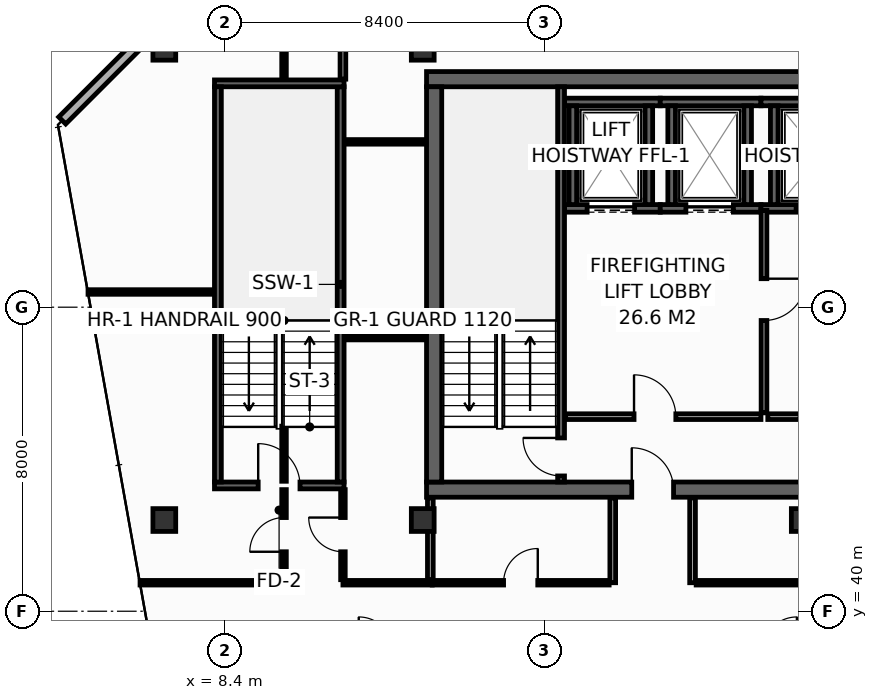
"""IFC4 building model, lengths in metres.
Left out: names, types, materials, properties, quantities, classifications, styles, units other than length and angle.
Written with IfcOpenShell. Run it as: python <this file> out.ifc"""

import sys

from ifc_helpers import new_model, si_unit, direction, frame, frame_2d, origin, origin_2d, place, context, subcontext, project, spatial, rectangle, hollow_rectangle, extrude, element, fill, save


model = new_model("IFC4")
c1 = context("Model", 3, precision=1e-05, world=origin(), true_north=direction((0.0, 1.0)))
c2 = subcontext(c1, "Body", "Model", "MODEL_VIEW")
j1 = project(units=[si_unit("LENGTHUNIT", "METRE"), si_unit("PLANEANGLEUNIT", "RADIAN")], contexts=[c1])
p1 = place(None, origin())
s1 = spatial("IfcSite", under=j1, at=p1, CompositionType="ELEMENT")
p2 = place(p1, origin())
s2 = spatial("IfcBuilding", under=s1, at=p2, CompositionType="ELEMENT")
p3 = place(p2, frame((0.0, 0.0, 268.6)))
s3 = spatial("IfcBuildingStorey", under=s2, at=p3, CompositionType="ELEMENT", Elevation=268.6)
p4 = place(p3, frame((13.7, 43.2, 0.0), z_axis=(0.0, 0.0, 1.0), x_axis=(1.0, 0.0, 0.0)))
e1 = element("IfcWall", 1, at=p4, inside=s3, PredefinedType="SHEAR", context=c2, shape_type="SweptSolid", body=[
    extrude(rectangle(XDim=32.5, YDim=0.4, at=frame_2d((16.25, 0.0))), origin(), (0.0, 0.0, 1.0), 3.55),
])
p5 = place(p4, frame((5.4, 0.0, 0.0)))
e2 = element("IfcOpeningElement", 2, at=p5, cuts=e1, PredefinedType="OPENING", context=c2, shape_type="SweptSolid", body=[
    extrude(rectangle(XDim=1.1, YDim=2.15, at=frame_2d((0.55, 1.075))), frame((0.0, 0.21, 0.0), z_axis=(0.0, -1.0, 0.0), x_axis=(1.0, 0.0, 0.0)), (0.0, 0.0, 1.0), 0.42),
])
p6 = place(p4, frame((25.6, 0.0, 0.0)))
e3 = element("IfcOpeningElement", 3, at=p6, cuts=e1, PredefinedType="OPENING", context=c2, shape_type="SweptSolid", body=[
    extrude(rectangle(XDim=1.1, YDim=2.15, at=frame_2d((0.55, 1.075))), frame((0.0, 0.21, 0.0), z_axis=(0.0, -1.0, 0.0), x_axis=(1.0, 0.0, 0.0)), (0.0, 0.0, 1.0), 0.42),
])
p7 = place(p3, frame((13.7, 54.0, 0.0), z_axis=(0.0, 0.0, 1.0), x_axis=(1.0, 0.0, 0.0)))
e4 = element("IfcWall", 4, at=p7, inside=s3, PredefinedType="SHEAR", context=c2, shape_type="SweptSolid", body=[
    extrude(rectangle(XDim=32.5, YDim=0.4, at=frame_2d((16.25, 0.0))), origin(), (0.0, 0.0, 1.0), 3.55),
])
p8 = place(p3, frame((13.9, 43.4, 0.0), z_axis=(0.0, 0.0, 1.0), x_axis=(0.0, 1.0, 0.0)))
e5 = element("IfcWall", 5, at=p8, inside=s3, PredefinedType="SHEAR", context=c2, shape_type="SweptSolid", body=[
    extrude(rectangle(XDim=10.4, YDim=0.4, at=frame_2d((5.2, 0.0))), origin(), (0.0, 0.0, 1.0), 3.55),
])
for number, where, z_axis, x_axis in (
    (6, (6.8, 54.8, 0.0), (0.0, 0.0, 1.0), (1.0, 0.0, 0.0)),
    (7, (13.6, 54.8, 0.0), (0.0, 0.0, 1.0), (1.0, 0.0, 0.0)),
    (8, (6.8, 42.4, 0.0), (0.0, 0.0, 1.0), (1.0, 0.0, 0.0)),
    (9, (13.6, 42.4, 0.0), (0.0, 0.0, 1.0), (1.0, 0.0, 0.0)),
    (10, (23.6, 42.4, 0.0), (0.0, 0.0, 1.0), (1.0, 0.0, 0.0)),
):
    element("IfcColumn", number, at=place(p3, frame(where, z_axis=z_axis, x_axis=x_axis)), inside=s3, PredefinedType="COLUMN", context=c2, shape_type="SweptSolid", body=[
        extrude(hollow_rectangle(XDim=0.6, YDim=0.6, WallThickness=0.028, at=origin_2d()), origin(), (0.0, 0.0, 1.0), 3.8),
    ])
p9 = place(p3, frame((17.33, 50.6, 0.0), z_axis=(0.0, 0.0, 1.0), x_axis=(1.0, 0.0, 0.0)))
e11 = element("IfcWall", 11, at=p9, inside=s3, PredefinedType="SHEAR", context=c2, shape_type="SweptSolid", body=[
    extrude(rectangle(XDim=2.52, YDim=0.2, at=frame_2d((1.26, 0.0))), origin(), (0.0, 0.0, 1.0), 3.55),
])
p10 = place(p9, frame((0.595, 0.0, 0.0)))
e12 = element("IfcOpeningElement", 12, at=p10, cuts=e11, PredefinedType="OPENING", context=c2, shape_type="SweptSolid", body=[
    extrude(rectangle(XDim=1.25, YDim=2.3, at=frame_2d((0.625, 1.15))), frame((0.0, 0.11, 0.0), z_axis=(0.0, -1.0, 0.0), x_axis=(1.0, 0.0, 0.0)), (0.0, 0.0, 1.0), 0.22),
])
p11 = place(p3, frame((17.33, 53.4, 0.0), z_axis=(0.0, 0.0, 1.0), x_axis=(1.0, 0.0, 0.0)))
e13 = element("IfcWall", 13, at=p11, inside=s3, PredefinedType="SHEAR", context=c2, shape_type="SweptSolid", body=[
    extrude(rectangle(XDim=2.52, YDim=0.2, at=frame_2d((1.26, 0.0))), origin(), (0.0, 0.0, 1.0), 3.55),
])
for number, where, z_axis, x_axis in (
    (14, (17.55, 50.7, 0.0), (0.0, 0.0, 1.0), (0.0, 1.0, 0.0)),
    (15, (19.55, 50.7, 0.0), (0.0, 0.0, 1.0), (0.0, 1.0, 0.0)),
):
    element("IfcWall", number, at=place(p3, frame(where, z_axis=z_axis, x_axis=x_axis)), inside=s3, PredefinedType="SHEAR", context=c2, shape_type="SweptSolid", body=[
        extrude(rectangle(XDim=2.6, YDim=0.2, at=frame_2d((1.3, 0.0))), origin(), (0.0, 0.0, 1.0), 3.55),
    ])
p12 = place(p3, frame((19.85, 50.6, 0.0), z_axis=(0.0, 0.0, 1.0), x_axis=(1.0, 0.0, 0.0)))
e16 = element("IfcWall", 16, at=p12, inside=s3, PredefinedType="SHEAR", context=c2, shape_type="SweptSolid", body=[
    extrude(rectangle(XDim=2.65, YDim=0.2, at=frame_2d((1.325, 0.0))), origin(), (0.0, 0.0, 1.0), 3.55),
])
p13 = place(p12, frame((0.675, 0.0, 0.0)))
e17 = element("IfcOpeningElement", 17, at=p13, cuts=e16, PredefinedType="OPENING", context=c2, shape_type="SweptSolid", body=[
    extrude(rectangle(XDim=1.25, YDim=2.3, at=frame_2d((0.625, 1.15))), frame((0.0, 0.11, 0.0), z_axis=(0.0, -1.0, 0.0), x_axis=(1.0, 0.0, 0.0)), (0.0, 0.0, 1.0), 0.22),
])
p14 = place(p3, frame((19.85, 53.4, 0.0), z_axis=(0.0, 0.0, 1.0), x_axis=(1.0, 0.0, 0.0)))
e18 = element("IfcWall", 18, at=p14, inside=s3, PredefinedType="SHEAR", context=c2, shape_type="SweptSolid", body=[
    extrude(rectangle(XDim=2.65, YDim=0.2, at=frame_2d((1.325, 0.0))), origin(), (0.0, 0.0, 1.0), 3.55),
])
for number, where, z_axis, x_axis in (
    (19, (20.15, 50.7, 0.0), (0.0, 0.0, 1.0), (0.0, 1.0, 0.0)),
    (20, (22.15, 50.7, 0.0), (0.0, 0.0, 1.0), (0.0, 1.0, 0.0)),
):
    element("IfcWall", number, at=place(p3, frame(where, z_axis=z_axis, x_axis=x_axis)), inside=s3, PredefinedType="SHEAR", context=c2, shape_type="SweptSolid", body=[
        extrude(rectangle(XDim=2.6, YDim=0.2, at=frame_2d((1.3, 0.0))), origin(), (0.0, 0.0, 1.0), 3.55),
    ])
p15 = place(p3, frame((22.5, 50.6, 0.0), z_axis=(0.0, 0.0, 1.0), x_axis=(1.0, 0.0, 0.0)))
e21 = element("IfcWall", 21, at=p15, inside=s3, PredefinedType="SHEAR", context=c2, shape_type="SweptSolid", body=[
    extrude(rectangle(XDim=2.85, YDim=0.2, at=frame_2d((1.425, 0.0))), origin(), (0.0, 0.0, 1.0), 3.55),
])
p16 = place(p15, frame((0.925, 0.0, 0.0)))
e22 = element("IfcOpeningElement", 22, at=p16, cuts=e21, PredefinedType="OPENING", context=c2, shape_type="SweptSolid", body=[
    extrude(rectangle(XDim=1.25, YDim=2.3, at=frame_2d((0.625, 1.15))), frame((0.0, 0.11, 0.0), z_axis=(0.0, -1.0, 0.0), x_axis=(1.0, 0.0, 0.0)), (0.0, 0.0, 1.0), 0.22),
])
p17 = place(p3, frame((22.5, 53.4, 0.0), z_axis=(0.0, 0.0, 1.0), x_axis=(1.0, 0.0, 0.0)))
e23 = element("IfcWall", 23, at=p17, inside=s3, PredefinedType="SHEAR", context=c2, shape_type="SweptSolid", body=[
    extrude(rectangle(XDim=2.85, YDim=0.2, at=frame_2d((1.425, 0.0))), origin(), (0.0, 0.0, 1.0), 3.55),
])
p18 = place(p3, frame((22.85, 50.7, 0.0), z_axis=(0.0, 0.0, 1.0), x_axis=(0.0, 1.0, 0.0)))
e24 = element("IfcWall", 24, at=p18, inside=s3, PredefinedType="SHEAR", context=c2, shape_type="SweptSolid", body=[
    extrude(rectangle(XDim=2.6, YDim=0.2, at=frame_2d((1.3, 0.0))), origin(), (0.0, 0.0, 1.0), 3.55),
])
p19 = place(p3, frame((17.24, 43.4, 0.0), z_axis=(0.0, 0.0, 1.0), x_axis=(0.0, 1.0, 0.0)))
e25 = element("IfcWall", 25, at=p19, inside=s3, PredefinedType="SHEAR", context=c2, shape_type="SweptSolid", body=[
    extrude(rectangle(XDim=10.4, YDim=0.18, at=frame_2d((5.2, 0.0))), origin(), (0.0, 0.0, 1.0), 3.55),
])
p20 = place(p19, frame((0.16, 0.0, 0.0)))
e26 = element("IfcOpeningElement", 26, at=p20, cuts=e25, PredefinedType="OPENING", context=c2, shape_type="SweptSolid", body=[
    extrude(rectangle(XDim=1.0, YDim=2.15, at=frame_2d((0.5, 1.075))), frame((0.0, 0.1, 0.0), z_axis=(0.0, -1.0, 0.0), x_axis=(1.0, 0.0, 0.0)), (0.0, 0.0, 1.0), 0.2),
])
p21 = place(p3, frame((8.12, 43.31, 0.0), z_axis=(0.0, 0.0, 1.0), x_axis=(1.0, 0.0, 0.0)))
e27 = element("IfcWall", 27, at=p21, inside=s3, PredefinedType="SHEAR", context=c2, shape_type="SweptSolid", body=[
    extrude(rectangle(XDim=3.41, YDim=0.18, at=frame_2d((1.705, 0.0))), origin(), (0.0, 0.0, 1.0), 3.55),
])
p22 = place(p21, frame((1.15, 0.0, 0.0)))
e28 = element("IfcOpeningElement", 28, at=p22, cuts=e27, PredefinedType="OPENING", context=c2, shape_type="SweptSolid", body=[
    extrude(rectangle(XDim=1.1, YDim=2.15, at=frame_2d((0.55, 1.075))), frame((0.0, 0.1, 0.0), z_axis=(0.0, -1.0, 0.0), x_axis=(1.0, 0.0, 0.0)), (0.0, 0.0, 1.0), 0.2),
])
p23 = place(p3, frame((11.44, 43.4, 0.0), z_axis=(0.0, 0.0, 1.0), x_axis=(0.0, 1.0, 0.0)))
e29 = element("IfcWall", 29, at=p23, inside=s3, PredefinedType="SHEAR", context=c2, shape_type="SweptSolid", body=[
    extrude(rectangle(XDim=10.4, YDim=0.18, at=frame_2d((5.2, 0.0))), origin(), (0.0, 0.0, 1.0), 3.55),
])
p24 = place(p3, frame((11.53, 53.89, 0.0), z_axis=(0.0, 0.0, 1.0), x_axis=(-1.0, 0.0, 0.0)))
e30 = element("IfcWall", 30, at=p24, inside=s3, PredefinedType="SHEAR", context=c2, shape_type="SweptSolid", body=[
    extrude(rectangle(XDim=3.41, YDim=0.18, at=frame_2d((1.705, 0.0))), origin(), (0.0, 0.0, 1.0), 3.55),
])
p25 = place(p3, frame((8.21, 53.8, 0.0), z_axis=(0.0, 0.0, 1.0), x_axis=(0.0, -1.0, 0.0)))
e31 = element("IfcWall", 31, at=p25, inside=s3, PredefinedType="SHEAR", context=c2, shape_type="SweptSolid", body=[
    extrude(rectangle(XDim=10.4, YDim=0.18, at=frame_2d((5.2, 0.0))), origin(), (0.0, 0.0, 1.0), 3.55),
])
p26 = place(p3, frame((17.36, 45.12, 0.0), z_axis=(0.0, 0.0, 1.0), x_axis=(1.0, 0.0, 0.0)))
e32 = element("IfcWall", 32, at=p26, inside=s3, PredefinedType="PARTITIONING", context=c2, shape_type="SweptSolid", body=[
    extrude(rectangle(XDim=5.14, YDim=0.15, at=frame_2d((2.57, 0.0))), origin(), (0.0, 0.0, 1.0), 3.55),
])
p27 = place(p26, frame((1.8, 0.0, 0.0)))
e33 = element("IfcOpeningElement", 33, at=p27, cuts=e32, PredefinedType="OPENING", context=c2, shape_type="SweptSolid", body=[
    extrude(rectangle(XDim=1.1, YDim=2.15, at=frame_2d((0.55, 1.075))), frame((0.0, 0.085, 0.0), z_axis=(0.0, -1.0, 0.0), x_axis=(1.0, 0.0, 0.0)), (0.0, 0.0, 1.0), 0.17),
])
p28 = place(p3, frame((22.58, 50.55, 0.0), z_axis=(0.0, 0.0, 1.0), x_axis=(0.0, -1.0, 0.0)))
e34 = element("IfcWall", 34, at=p28, inside=s3, PredefinedType="PARTITIONING", context=c2, shape_type="SweptSolid", body=[
    extrude(rectangle(XDim=5.33, YDim=0.15, at=frame_2d((2.665, 0.0))), origin(), (0.0, 0.0, 1.0), 3.55),
])
p29 = place(p28, frame((1.8, 0.0, 0.0)))
e35 = element("IfcOpeningElement", 35, at=p29, cuts=e34, PredefinedType="OPENING", context=c2, shape_type="SweptSolid", body=[
    extrude(rectangle(XDim=1.1, YDim=2.15, at=frame_2d((0.55, 1.075))), frame((0.0, 0.085, 0.0), z_axis=(0.0, -1.0, 0.0), x_axis=(1.0, 0.0, 0.0)), (0.0, 0.0, 1.0), 0.17),
])
p30 = place(p3, frame((22.68, 45.12, 0.0), z_axis=(0.0, 0.0, 1.0), x_axis=(1.0, 0.0, 0.0)))
e36 = element("IfcWall", 36, at=p30, inside=s3, PredefinedType="PARTITIONING", context=c2, shape_type="SweptSolid", body=[
    extrude(rectangle(XDim=2.92, YDim=0.15, at=frame_2d((1.46, 0.0))), origin(), (0.0, 0.0, 1.0), 3.55),
])
p31 = place(p30, frame((0.85, 0.0, 0.0)))
e37 = element("IfcOpeningElement", 37, at=p31, cuts=e36, PredefinedType="OPENING", context=c2, shape_type="SweptSolid", body=[
    extrude(rectangle(XDim=1.1, YDim=2.15, at=frame_2d((0.55, 1.075))), frame((0.0, 0.085, 0.0), z_axis=(0.0, -1.0, 0.0), x_axis=(1.0, 0.0, 0.0)), (0.0, 0.0, 1.0), 0.17),
])
p32 = place(p3, frame((7.087, 55.887, 0.0), z_axis=(0.0, 0.0, 1.0), x_axis=(-0.707106781187, -0.707106781187, 0.0)))
e38 = element("IfcWall", 38, at=p32, inside=s3, PredefinedType="STANDARD", context=c2, shape_type="SweptSolid", body=[
    extrude(rectangle(XDim=4.206, YDim=0.26, at=frame_2d((2.103, 0.0))), origin(), (0.0, 0.0, 1.0), 3.55),
])
p33 = place(p3, frame((6.161, 40.75, 0.0), z_axis=(0.0, 0.0, 1.0), x_axis=(1.0, 0.0, 0.0)))
e39 = element("IfcWall", 39, at=p33, inside=s3, PredefinedType="PARTITIONING", context=c2, shape_type="SweptSolid", body=[
    extrude(rectangle(XDim=3.789, YDim=0.12, at=frame_2d((1.894, 0.0))), origin(), (0.0, 0.0, 1.0), 3.085),
])
p34 = place(p3, frame((11.5, 40.75, 0.0), z_axis=(0.0, 0.0, 1.0), x_axis=(1.0, 0.0, 0.0)))
e40 = element("IfcWall", 40, at=p34, inside=s3, PredefinedType="PARTITIONING", context=c2, shape_type="SweptSolid", body=[
    extrude(rectangle(XDim=2.35, YDim=0.12, at=frame_2d((1.175, 0.0))), origin(), (0.0, 0.0, 1.0), 3.55),
])
p35 = place(p3, frame((11.55, 52.35, 0.0), z_axis=(0.0, 0.0, 1.0), x_axis=(1.0, 0.0, 0.0)))
e41 = element("IfcWall", 41, at=p35, inside=s3, PredefinedType="PARTITIONING", context=c2, shape_type="SweptSolid", body=[
    extrude(rectangle(XDim=2.13, YDim=0.12, at=frame_2d((1.065, 0.0))), origin(), (0.0, 0.0, 1.0), 3.55),
])
p36 = place(p3, frame((11.5, 54.0, 0.0), z_axis=(0.0, 0.0, 1.0), x_axis=(0.0, 1.0, 0.0)))
e42 = element("IfcWall", 42, at=p36, inside=s3, PredefinedType="PARTITIONING", context=c2, shape_type="SweptSolid", body=[
    extrude(rectangle(XDim=1.995, YDim=0.15, at=frame_2d((0.998, 0.0))), origin(), (0.0, 0.0, 1.0), 2.935),
])
p37 = place(p3, frame((4.792, 48.4, 0.0), z_axis=(0.0, 0.0, 1.0), x_axis=(1.0, 0.0, 0.0)))
e43 = element("IfcWall", 43, at=p37, inside=s3, PredefinedType="PARTITIONING", context=c2, shape_type="SweptSolid", body=[
    extrude(rectangle(XDim=3.308, YDim=0.12, at=frame_2d((1.654, 0.0))), origin(), (0.0, 0.0, 1.0), 2.947),
])
p38 = place(p3, frame((9.95, 40.83, 0.0), z_axis=(0.0, 0.0, 1.0), x_axis=(0.0, 1.0, 0.0)))
e44 = element("IfcWall", 44, at=p38, inside=s3, PredefinedType="PARTITIONING", context=c2, shape_type="SweptSolid", body=[
    extrude(rectangle(XDim=2.37, YDim=0.12, at=frame_2d((1.185, 0.0))), origin(), (0.0, 0.0, 1.0), 2.947),
])
p39 = place(p38, frame((0.735, 0.0, 0.0)))
e45 = element("IfcOpeningElement", 45, at=p39, cuts=e44, PredefinedType="OPENING", context=c2, shape_type="SweptSolid", body=[
    extrude(rectangle(XDim=0.9, YDim=2.1, at=frame_2d((0.45, 1.05))), frame((0.0, 0.07, 0.0), z_axis=(0.0, -1.0, 0.0), x_axis=(1.0, 0.0, 0.0)), (0.0, 0.0, 1.0), 0.14),
])
p40 = place(p3, frame((9.95, 43.42, 0.0), z_axis=(0.0, 0.0, 1.0), x_axis=(0.0, 1.0, 0.0)))
e46 = element("IfcWall", 46, at=p40, inside=s3, PredefinedType="PARTITIONING", context=c2, shape_type="SweptSolid", body=[
    extrude(rectangle(XDim=1.45, YDim=0.12, at=frame_2d((0.725, 0.0))), origin(), (0.0, 0.0, 1.0), 3.55),
])
p41 = place(p3, frame((9.95, 54.0, 0.0), z_axis=(0.0, 0.0, 1.0), x_axis=(0.0, 1.0, 0.0)))
e47 = element("IfcWall", 47, at=p41, inside=s3, PredefinedType="PARTITIONING", context=c2, shape_type="SweptSolid", body=[
    extrude(rectangle(XDim=1.995, YDim=0.12, at=frame_2d((0.998, 0.0))), origin(), (0.0, 0.0, 1.0), 2.935),
])
p42 = place(p3, frame((11.55, 47.2, 0.0), z_axis=(0.0, 0.0, 1.0), x_axis=(1.0, 0.0, 0.0)))
e48 = element("IfcWall", 48, at=p42, inside=s3, PredefinedType="PARTITIONING", context=c2, shape_type="SweptSolid", body=[
    extrude(rectangle(XDim=2.13, YDim=0.12, at=frame_2d((1.065, 0.0))), origin(), (0.0, 0.0, 1.0), 3.55),
])
p43 = place(p3, frame((11.5, 40.83, 0.0), z_axis=(0.0, 0.0, 1.0), x_axis=(0.0, 1.0, 0.0)))
e49 = element("IfcWall", 49, at=p43, inside=s3, PredefinedType="PARTITIONING", context=c2, shape_type="SweptSolid", body=[
    extrude(rectangle(XDim=2.37, YDim=0.12, at=frame_2d((1.185, 0.0))), origin(), (0.0, 0.0, 1.0), 2.947),
])
p44 = place(p43, frame((0.735, 0.0, 0.0)))
e50 = element("IfcOpeningElement", 50, at=p44, cuts=e49, PredefinedType="OPENING", context=c2, shape_type="SweptSolid", body=[
    extrude(rectangle(XDim=0.9, YDim=2.1, at=frame_2d((0.45, 1.05))), frame((0.0, 0.07, 0.0), z_axis=(0.0, -1.0, 0.0), x_axis=(1.0, 0.0, 0.0)), (0.0, 0.0, 1.0), 0.14),
])
p45 = place(p3, frame((13.8, 40.83, 0.0), z_axis=(0.0, 0.0, 1.0), x_axis=(0.0, 1.0, 0.0)))
e51 = element("IfcWall", 51, at=p45, inside=s3, PredefinedType="PARTITIONING", context=c2, shape_type="SweptSolid", body=[
    extrude(rectangle(XDim=2.15, YDim=0.15, at=frame_2d((1.075, 0.0))), origin(), (0.0, 0.0, 1.0), 3.55),
])
for number, where, z_axis, x_axis in (
    (52, (18.6, 40.75, 0.0), (0.0, 0.0, 1.0), (0.0, 1.0, 0.0)),
    (53, (20.7, 40.75, 0.0), (0.0, 0.0, 1.0), (0.0, 1.0, 0.0)),
):
    element("IfcWall", number, at=place(p3, frame(where, z_axis=z_axis, x_axis=x_axis)), inside=s3, PredefinedType="PARTITIONING", context=c2, shape_type="SweptSolid", body=[
        extrude(rectangle(XDim=2.23, YDim=0.15, at=frame_2d((1.115, 0.0))), origin(), (0.0, 0.0, 1.0), 3.55),
    ])
p46 = place(p3, frame((13.85, 40.75, 0.0), z_axis=(0.0, 0.0, 1.0), x_axis=(1.0, 0.0, 0.0)))
e54 = element("IfcWall", 54, at=p46, inside=s3, PredefinedType="PARTITIONING", context=c2, shape_type="SweptSolid", body=[
    extrude(rectangle(XDim=4.655, YDim=0.12, at=frame_2d((2.327, 0.0))), origin(), (0.0, 0.0, 1.0), 3.55),
])
p47 = place(p46, frame((1.877, 0.0, 0.0)))
e55 = element("IfcOpeningElement", 55, at=p47, cuts=e54, PredefinedType="OPENING", context=c2, shape_type="SweptSolid", body=[
    extrude(rectangle(XDim=0.9, YDim=2.1, at=frame_2d((0.45, 1.05))), frame((0.0, 0.07, 0.0), z_axis=(0.0, -1.0, 0.0), x_axis=(1.0, 0.0, 0.0)), (0.0, 0.0, 1.0), 0.14),
])
p48 = place(p3, frame((20.795, 40.75, 0.0), z_axis=(0.0, 0.0, 1.0), x_axis=(1.0, 0.0, 0.0)))
e56 = element("IfcWall", 56, at=p48, inside=s3, PredefinedType="PARTITIONING", context=c2, shape_type="SweptSolid", body=[
    extrude(rectangle(XDim=17.91, YDim=0.12, at=frame_2d((8.955, 0.0))), origin(), (0.0, 0.0, 1.0), 2.947),
])
p49 = place(p48, frame((8.505, 0.0, 0.0)))
e57 = element("IfcOpeningElement", 57, at=p49, cuts=e56, PredefinedType="OPENING", context=c2, shape_type="SweptSolid", body=[
    extrude(rectangle(XDim=0.9, YDim=2.1, at=frame_2d((0.45, 1.05))), frame((0.0, 0.07, 0.0), z_axis=(0.0, -1.0, 0.0), x_axis=(1.0, 0.0, 0.0)), (0.0, 0.0, 1.0), 0.14),
])
p50 = place(p10, origin())
e58 = element("IfcDoor", 58, at=p50, inside=s3, OperationType="SLIDING_TO_LEFT", PredefinedType="DOOR", context=c2, shape_type="SweptSolid", body=[
    extrude(rectangle(XDim=1.25, YDim=2.3, at=frame_2d((0.625, 1.15))), frame((0.0, 0.025, 0.0), z_axis=(0.0, -1.0, 0.0), x_axis=(1.0, 0.0, 0.0)), (0.0, 0.0, 1.0), 0.05),
])
fill(e12, e58)
p51 = place(p13, origin())
e59 = element("IfcDoor", 59, at=p51, inside=s3, OperationType="SLIDING_TO_LEFT", PredefinedType="DOOR", context=c2, shape_type="SweptSolid", body=[
    extrude(rectangle(XDim=1.25, YDim=2.3, at=frame_2d((0.625, 1.15))), frame((0.0, 0.025, 0.0), z_axis=(0.0, -1.0, 0.0), x_axis=(1.0, 0.0, 0.0)), (0.0, 0.0, 1.0), 0.05),
])
fill(e17, e59)
p52 = place(p16, origin())
e60 = element("IfcDoor", 60, at=p52, inside=s3, OperationType="SLIDING_TO_LEFT", PredefinedType="DOOR", context=c2, shape_type="SweptSolid", body=[
    extrude(rectangle(XDim=1.25, YDim=2.3, at=frame_2d((0.625, 1.15))), frame((0.0, 0.025, 0.0), z_axis=(0.0, -1.0, 0.0), x_axis=(1.0, 0.0, 0.0)), (0.0, 0.0, 1.0), 0.05),
])
fill(e22, e60)
p53 = place(p20, origin())
e61 = element("IfcDoor", 61, at=p53, inside=s3, OperationType="SINGLE_SWING_RIGHT", PredefinedType="DOOR", context=c2, shape_type="SweptSolid", body=[
    extrude(rectangle(XDim=1.0, YDim=2.15, at=frame_2d((0.5, 1.075))), frame((0.0, 0.025, 0.0), z_axis=(0.0, -1.0, 0.0), x_axis=(1.0, 0.0, 0.0)), (0.0, 0.0, 1.0), 0.05),
])
fill(e26, e61)
p54 = place(p22, origin())
e62 = element("IfcDoor", 62, at=p54, inside=s3, OperationType="SINGLE_SWING_LEFT", PredefinedType="DOOR", context=c2, shape_type="SweptSolid", body=[
    extrude(rectangle(XDim=1.1, YDim=2.15, at=frame_2d((0.55, 1.075))), frame((0.0, 0.025, 0.0), z_axis=(0.0, -1.0, 0.0), x_axis=(1.0, 0.0, 0.0)), (0.0, 0.0, 1.0), 0.05),
])
fill(e28, e62)
p55 = place(p27, origin())
e63 = element("IfcDoor", 63, at=p55, inside=s3, OperationType="SINGLE_SWING_LEFT", PredefinedType="DOOR", context=c2, shape_type="SweptSolid", body=[
    extrude(rectangle(XDim=1.1, YDim=2.15, at=frame_2d((0.55, 1.075))), frame((0.0, 0.025, 0.0), z_axis=(0.0, -1.0, 0.0), x_axis=(1.0, 0.0, 0.0)), (0.0, 0.0, 1.0), 0.05),
])
fill(e33, e63)
p56 = place(p29, origin())
e64 = element("IfcDoor", 64, at=p56, inside=s3, OperationType="SINGLE_SWING_LEFT", PredefinedType="DOOR", context=c2, shape_type="SweptSolid", body=[
    extrude(rectangle(XDim=1.1, YDim=2.15, at=frame_2d((0.55, 1.075))), frame((0.0, 0.025, 0.0), z_axis=(0.0, -1.0, 0.0), x_axis=(1.0, 0.0, 0.0)), (0.0, 0.0, 1.0), 0.05),
])
fill(e35, e64)
p57 = place(p5, origin())
e65 = element("IfcDoor", 65, at=p57, inside=s3, OperationType="SINGLE_SWING_LEFT", PredefinedType="DOOR", context=c2, shape_type="SweptSolid", body=[
    extrude(rectangle(XDim=1.1, YDim=2.15, at=frame_2d((0.55, 1.075))), frame((0.0, 0.025, 0.0), z_axis=(0.0, -1.0, 0.0), x_axis=(1.0, 0.0, 0.0)), (0.0, 0.0, 1.0), 0.05),
])
fill(e2, e65)
p58 = place(p39, origin())
e66 = element("IfcDoor", 66, at=p58, inside=s3, OperationType="SINGLE_SWING_LEFT", PredefinedType="DOOR", context=c2, shape_type="SweptSolid", body=[
    extrude(rectangle(XDim=0.9, YDim=2.1, at=frame_2d((0.45, 1.05))), frame((0.0, 0.025, 0.0), z_axis=(0.0, -1.0, 0.0), x_axis=(1.0, 0.0, 0.0)), (0.0, 0.0, 1.0), 0.05),
])
fill(e45, e66)
p59 = place(p44, origin())
e67 = element("IfcDoor", 67, at=p59, inside=s3, OperationType="SINGLE_SWING_RIGHT", PredefinedType="DOOR", context=c2, shape_type="SweptSolid", body=[
    extrude(rectangle(XDim=0.9, YDim=2.1, at=frame_2d((0.45, 1.05))), frame((0.0, 0.025, 0.0), z_axis=(0.0, -1.0, 0.0), x_axis=(1.0, 0.0, 0.0)), (0.0, 0.0, 1.0), 0.05),
])
fill(e50, e67)
p60 = place(p47, origin())
e68 = element("IfcDoor", 68, at=p60, inside=s3, OperationType="SINGLE_SWING_RIGHT", PredefinedType="DOOR", context=c2, shape_type="SweptSolid", body=[
    extrude(rectangle(XDim=0.9, YDim=2.1, at=frame_2d((0.45, 1.05))), frame((0.0, 0.025, 0.0), z_axis=(0.0, -1.0, 0.0), x_axis=(1.0, 0.0, 0.0)), (0.0, 0.0, 1.0), 0.05),
])
fill(e55, e68)
save(model, sys.argv[1])
